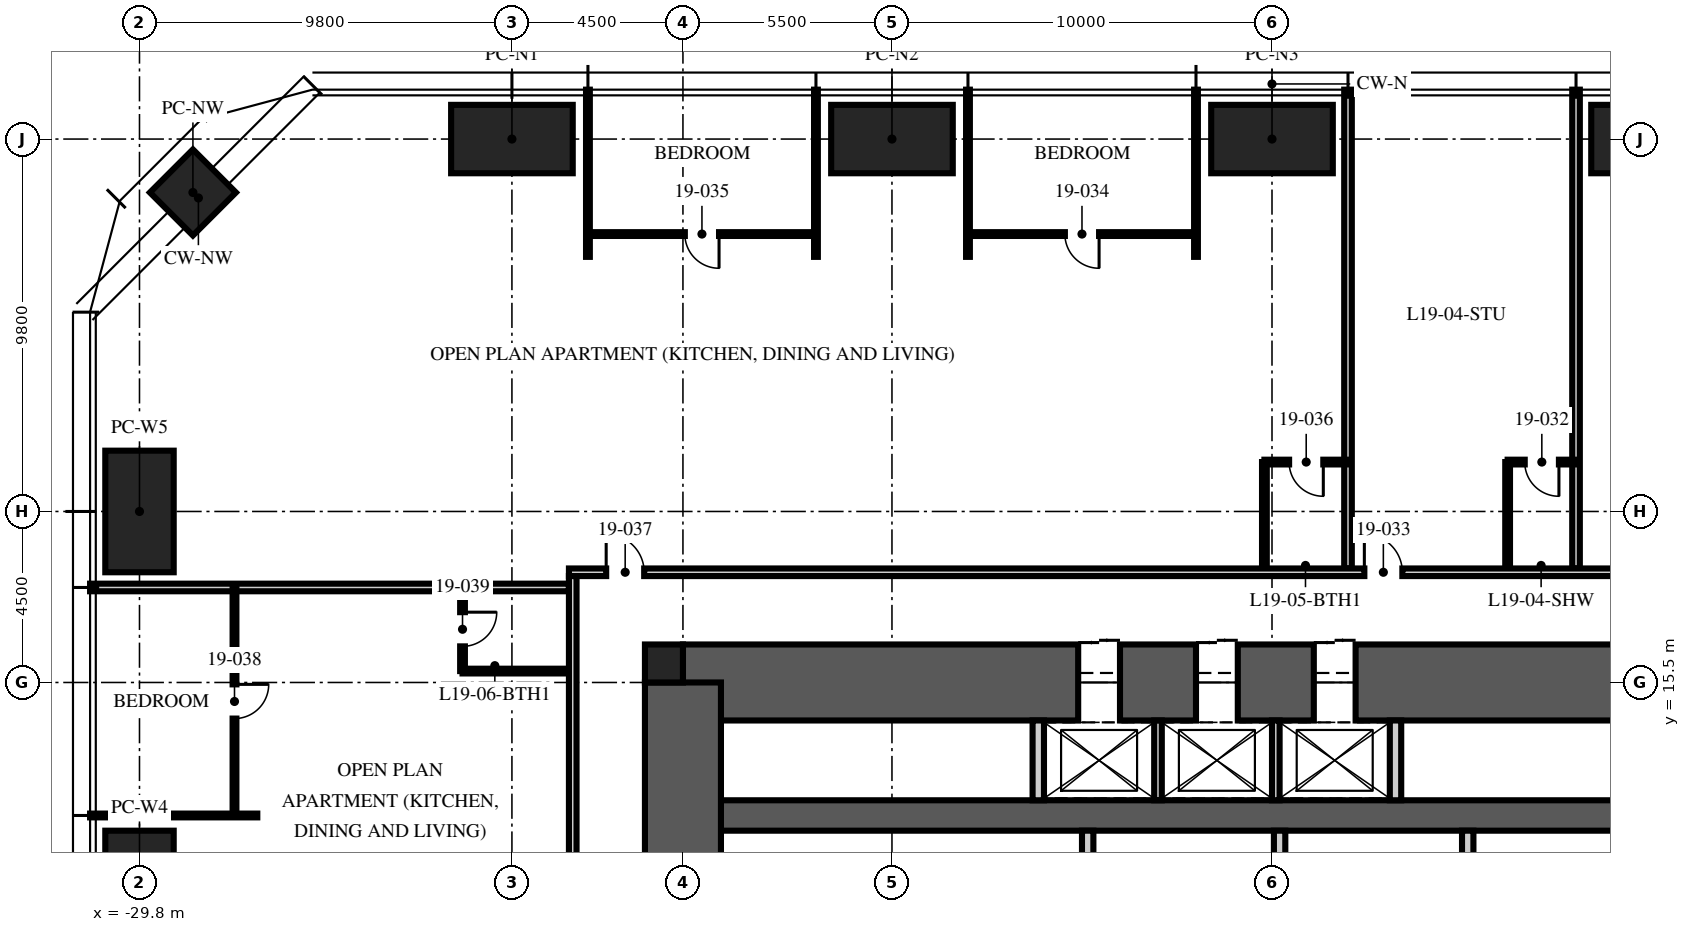
"""IFC4 building model, lengths in metres.
Left out: names, types, materials, properties, quantities, classifications, styles, units other than length and angle.
Written with IfcOpenShell. Run it as: python <this file> out.ifc"""

import sys

from ifc_helpers import new_model, si_unit, direction, frame, frame_2d, origin, origin_2d, place, context, subcontext, project, spatial, rectangle, hollow_rectangle, extrude, element, fill, save


model = new_model("IFC4")
c1 = context("Model", 3, precision=1e-05, world=origin(), true_north=direction((0.0, 1.0)))
c2 = subcontext(c1, "Body", "Model", "MODEL_VIEW")
j1 = project(units=[si_unit("LENGTHUNIT", "METRE"), si_unit("PLANEANGLEUNIT", "RADIAN")], contexts=[c1])
p1 = place(None, origin())
s1 = spatial("IfcSite", under=j1, at=p1, CompositionType="ELEMENT")
p2 = place(p1, origin())
s2 = spatial("IfcBuilding", under=s1, at=p2, CompositionType="ELEMENT")
p3 = place(p2, frame((0.0, 0.0, 77.25)))
s3 = spatial("IfcBuildingStorey", under=s2, at=p3, CompositionType="ELEMENT", Elevation=77.25)
p4 = place(p3, frame((-15.5, 15.5, -0.25), z_axis=(0.0, 0.0, 1.0), x_axis=(1.0, 0.0, 0.0)))
e1 = element("IfcWall", 1, at=p4, inside=s3, PredefinedType="SHEAR", context=c2, shape_type="SweptSolid", body=[
    extrude(rectangle(XDim=31.0, YDim=2.0, at=frame_2d((15.5, 0.0))), origin(), (0.0, 0.0, 1.0), 3.75),
])
p5 = place(p4, frame((10.4, 0.0, 0.25)))
e2 = element("IfcOpeningElement", 2, at=p5, cuts=e1, PredefinedType="OPENING", context=c2, shape_type="SweptSolid", body=[
    extrude(rectangle(XDim=1.1, YDim=2.1, at=frame_2d((0.55, 1.05))), frame((0.0, 1.01, 0.0), z_axis=(0.0, -1.0, 0.0), x_axis=(1.0, 0.0, 0.0)), (0.0, 0.0, 1.0), 2.02),
])
p6 = place(p4, frame((13.5, 0.0, 0.25)))
e3 = element("IfcOpeningElement", 3, at=p6, cuts=e1, PredefinedType="OPENING", context=c2, shape_type="SweptSolid", body=[
    extrude(rectangle(XDim=1.1, YDim=2.1, at=frame_2d((0.55, 1.05))), frame((0.0, 1.01, 0.0), z_axis=(0.0, -1.0, 0.0), x_axis=(1.0, 0.0, 0.0)), (0.0, 0.0, 1.0), 2.02),
])
p7 = place(p4, frame((16.6, 0.0, 0.25)))
e4 = element("IfcOpeningElement", 4, at=p7, cuts=e1, PredefinedType="OPENING", context=c2, shape_type="SweptSolid", body=[
    extrude(rectangle(XDim=1.1, YDim=2.1, at=frame_2d((0.55, 1.05))), frame((0.0, 1.01, 0.0), z_axis=(0.0, -1.0, 0.0), x_axis=(1.0, 0.0, 0.0)), (0.0, 0.0, 1.0), 2.02),
])
p8 = place(p3, frame((-15.5, 12.0, -0.25), z_axis=(0.0, 0.0, 1.0), x_axis=(1.0, 0.0, 0.0)))
e5 = element("IfcWall", 5, at=p8, inside=s3, PredefinedType="SHEAR", context=c2, shape_type="SweptSolid", body=[
    extrude(rectangle(XDim=31.0, YDim=0.8, at=frame_2d((15.5, 0.0))), origin(), (0.0, 0.0, 1.0), 3.75),
])
p9 = place(p3, frame((-15.5, -15.5, -0.25), z_axis=(0.0, 0.0, 1.0), x_axis=(0.0, 1.0, 0.0)))
e6 = element("IfcWall", 6, at=p9, inside=s3, PredefinedType="SHEAR", context=c2, shape_type="SweptSolid", body=[
    extrude(rectangle(XDim=31.0, YDim=2.0, at=frame_2d((15.5, 0.0))), origin(), (0.0, 0.0, 1.0), 3.75),
])
p10 = place(p9, frame((6.5, 0.0, 0.25)))
e7 = element("IfcOpeningElement", 7, at=p10, cuts=e6, PredefinedType="OPENING", context=c2, shape_type="SweptSolid", body=[
    extrude(rectangle(XDim=1.2, YDim=2.1, at=frame_2d((0.6, 1.05))), frame((0.0, 1.01, 0.0), z_axis=(0.0, -1.0, 0.0), x_axis=(1.0, 0.0, 0.0)), (0.0, 0.0, 1.0), 2.02),
])
p11 = place(p9, frame((23.0, 0.0, 0.25)))
e8 = element("IfcOpeningElement", 8, at=p11, cuts=e6, PredefinedType="OPENING", context=c2, shape_type="SweptSolid", body=[
    extrude(rectangle(XDim=1.8, YDim=2.1, at=frame_2d((0.9, 1.05))), frame((0.0, 1.01, 0.0), z_axis=(0.0, -1.0, 0.0), x_axis=(1.0, 0.0, 0.0)), (0.0, 0.0, 1.0), 2.02),
])
p12 = place(p3, frame((-16.0, 16.0, -0.25), z_axis=(0.0, 0.0, 1.0), x_axis=(1.0, 0.0, 0.0)))
e9 = element("IfcColumn", 9, at=p12, inside=s3, PredefinedType="COLUMN", context=c2, shape_type="SweptSolid", body=[
    extrude(rectangle(XDim=1.0, YDim=1.0, at=origin_2d()), origin(), (0.0, 0.0, 1.0), 3.75),
])
for number, where, z_axis, x_axis in (
    (10, (-20.0, 29.8, 0.0), (0.0, 0.0, 1.0), (1.0, 0.0, 0.0)),
    (11, (-10.0, 29.8, 0.0), (0.0, 0.0, 1.0), (1.0, 0.0, 0.0)),
    (12, (0.0, 29.8, 0.0), (0.0, 0.0, 1.0), (1.0, 0.0, 0.0)),
    (13, (10.0, 29.8, 0.0), (0.0, 0.0, 1.0), (1.0, 0.0, 0.0)),
    (14, (-29.8, 10.0, 0.0), (0.0, 0.0, 1.0), (0.0, 1.0, 0.0)),
    (15, (-29.8, 20.0, 0.0), (0.0, 0.0, 1.0), (0.0, 1.0, 0.0)),
):
    element("IfcColumn", number, at=place(p3, frame(where, z_axis=z_axis, x_axis=x_axis)), inside=s3, PredefinedType="COLUMN", context=c2, shape_type="SweptSolid", body=[
        extrude(hollow_rectangle(XDim=3.2, YDim=1.8, WallThickness=0.2, at=origin_2d()), origin(), (0.0, 0.0, 1.0), 3.75),
    ])
p13 = place(p3, frame((-28.394, 28.394, 0.0), z_axis=(0.0, 0.0, 1.0), x_axis=(0.707106781187, 0.707106781187, 0.0)))
e16 = element("IfcColumn", 16, at=p13, inside=s3, PredefinedType="COLUMN", context=c2, shape_type="SweptSolid", body=[
    extrude(hollow_rectangle(XDim=1.6, YDim=1.6, WallThickness=0.1, at=origin_2d()), origin(), (0.0, 0.0, 1.0), 3.75),
])
for number, where, z_axis, x_axis in (
    (17, (-6.15, 12.4, 0.0), (0.0, 0.0, 1.0), (0.0, 1.0, 0.0)),
    (18, (3.25, 12.4, 0.0), (0.0, 0.0, 1.0), (0.0, 1.0, 0.0)),
):
    element("IfcWall", number, at=place(p3, frame(where, z_axis=z_axis, x_axis=x_axis)), inside=s3, PredefinedType="PARTITIONING", context=c2, shape_type="SweptSolid", body=[
        extrude(rectangle(XDim=2.1, YDim=0.3, at=frame_2d((1.05, 0.0))), origin(), (0.0, 0.0, 1.0), 3.5),
    ])
for number, where, z_axis, x_axis in (
    (19, (-3.0, 12.4, 0.0), (0.0, 0.0, 1.0), (0.0, 1.0, 0.0)),
    (20, (0.1, 12.4, 0.0), (0.0, 0.0, 1.0), (0.0, 1.0, 0.0)),
):
    element("IfcWall", number, at=place(p3, frame(where, z_axis=z_axis, x_axis=x_axis)), inside=s3, PredefinedType="PARTITIONING", context=c2, shape_type="SweptSolid", body=[
        extrude(rectangle(XDim=2.1, YDim=0.2, at=frame_2d((1.05, 0.0))), origin(), (0.0, 0.0, 1.0), 3.5),
    ])
p14 = place(p3, frame((-4.85, 5.3, 0.0), z_axis=(0.0, 0.0, 1.0), x_axis=(0.0, 1.0, 0.0)))
e21 = element("IfcWall", 21, at=p14, inside=s3, PredefinedType="PARTITIONING", context=c2, shape_type="SweptSolid", body=[
    extrude(rectangle(XDim=6.3, YDim=0.3, at=frame_2d((3.15, 0.0))), origin(), (0.0, 0.0, 1.0), 3.5),
])
p15 = place(p14, frame((4.35, 0.0, 0.0)))
e22 = element("IfcOpeningElement", 22, at=p15, cuts=e21, PredefinedType="OPENING", context=c2, shape_type="SweptSolid", body=[
    extrude(rectangle(XDim=0.9, YDim=2.1, at=frame_2d((0.45, 1.05))), frame((0.0, 0.16, 0.0), z_axis=(0.0, -1.0, 0.0), x_axis=(1.0, 0.0, 0.0)), (0.0, 0.0, 1.0), 0.32),
])
p16 = place(p3, frame((5.15, 5.3, 0.0), z_axis=(0.0, 0.0, 1.0), x_axis=(0.0, 1.0, 0.0)))
e23 = element("IfcWall", 23, at=p16, inside=s3, PredefinedType="PARTITIONING", context=c2, shape_type="SweptSolid", body=[
    extrude(rectangle(XDim=6.3, YDim=0.3, at=frame_2d((3.15, 0.0))), origin(), (0.0, 0.0, 1.0), 3.5),
])
p17 = place(p16, frame((4.35, 0.0, 0.0)))
e24 = element("IfcOpeningElement", 24, at=p17, cuts=e23, PredefinedType="OPENING", context=c2, shape_type="SweptSolid", body=[
    extrude(rectangle(XDim=0.9, YDim=2.1, at=frame_2d((0.45, 1.05))), frame((0.0, 0.16, 0.0), z_axis=(0.0, -1.0, 0.0), x_axis=(1.0, 0.0, 0.0)), (0.0, 0.0, 1.0), 0.32),
])
p18 = place(p3, frame((0.2, 8.5, 0.0), z_axis=(0.0, 0.0, 1.0), x_axis=(0.0, 1.0, 0.0)))
e25 = element("IfcWall", 25, at=p18, inside=s3, PredefinedType="PARTITIONING", context=c2, shape_type="SweptSolid", body=[
    extrude(rectangle(XDim=3.1, YDim=0.3, at=frame_2d((1.55, 0.0))), origin(), (0.0, 0.0, 1.0), 3.5),
])
for number, where, z_axis, x_axis in (
    (26, (8.0, 18.5, 0.0), (0.0, 0.0, 1.0), (0.0, 1.0, 0.0)),
    (27, (2.0, 18.5, 0.0), (0.0, 0.0, 1.0), (0.0, 1.0, 0.0)),
):
    element("IfcWall", number, at=place(p3, frame(where, z_axis=z_axis, x_axis=x_axis)), inside=s3, PredefinedType="PARTITIONING", context=c2, shape_type="SweptSolid", body=[
        extrude(rectangle(XDim=12.6, YDim=0.2, at=frame_2d((6.3, 0.0))), origin(), (0.0, 0.0, 1.0), 2.71),
    ])
for number, where, z_axis, x_axis in (
    (28, (-2.0, 26.7, 0.0), (0.0, 0.0, 1.0), (0.0, 1.0, 0.0)),
    (29, (-8.0, 26.7, 0.0), (0.0, 0.0, 1.0), (0.0, 1.0, 0.0)),
    (30, (-12.0, 26.7, 0.0), (0.0, 0.0, 1.0), (0.0, 1.0, 0.0)),
    (31, (-18.0, 26.7, 0.0), (0.0, 0.0, 1.0), (0.0, 1.0, 0.0)),
):
    element("IfcWall", number, at=place(p3, frame(where, z_axis=z_axis, x_axis=x_axis)), inside=s3, PredefinedType="PARTITIONING", context=c2, shape_type="SweptSolid", body=[
        extrude(rectangle(XDim=4.4, YDim=0.1, at=frame_2d((2.2, 0.0))), origin(), (0.0, 0.0, 1.0), 2.71),
    ])
p19 = place(p3, frame((-18.5, 18.0, 0.0), z_axis=(0.0, 0.0, 1.0), x_axis=(-1.0, 0.0, 0.0)))
e32 = element("IfcWall", 32, at=p19, inside=s3, PredefinedType="PARTITIONING", context=c2, shape_type="SweptSolid", body=[
    extrude(rectangle(XDim=12.6, YDim=0.2, at=frame_2d((6.3, 0.0))), origin(), (0.0, 0.0, 1.0), 2.3),
])
p20 = place(p3, frame((-26.7, 12.0, 0.0), z_axis=(0.0, 0.0, 1.0), x_axis=(-1.0, 0.0, 0.0)))
e33 = element("IfcWall", 33, at=p20, inside=s3, PredefinedType="PARTITIONING", context=c2, shape_type="SweptSolid", body=[
    extrude(rectangle(XDim=4.4, YDim=0.1, at=frame_2d((2.2, 0.0))), origin(), (0.0, 0.0, 1.0), 2.71),
])
p21 = place(p3, frame((8.0, 21.3, 0.0), z_axis=(0.0, 0.0, 1.0), x_axis=(-1.0, 0.0, 0.0)))
e34 = element("IfcWall", 34, at=p21, inside=s3, PredefinedType="PARTITIONING", context=c2, shape_type="SweptSolid", body=[
    extrude(rectangle(XDim=1.8, YDim=0.125, at=frame_2d((0.9, 0.0))), origin(), (0.0, 0.0, 1.0), 3.5),
])
p22 = place(p21, frame((0.45, 0.0, 0.0)))
e35 = element("IfcOpeningElement", 35, at=p22, cuts=e34, PredefinedType="OPENING", context=c2, shape_type="SweptSolid", body=[
    extrude(rectangle(XDim=0.9, YDim=2.1, at=frame_2d((0.45, 1.05))), frame((0.0, 0.073, 0.0), z_axis=(0.0, -1.0, 0.0), x_axis=(1.0, 0.0, 0.0)), (0.0, 0.0, 1.0), 0.145),
])
p23 = place(p3, frame((6.2, 18.5, 0.0), z_axis=(0.0, 0.0, 1.0), x_axis=(0.0, 1.0, 0.0)))
e36 = element("IfcWall", 36, at=p23, inside=s3, PredefinedType="PARTITIONING", context=c2, shape_type="SweptSolid", body=[
    extrude(rectangle(XDim=2.8, YDim=0.125, at=frame_2d((1.4, 0.0))), origin(), (0.0, 0.0, 1.0), 3.5),
])
p24 = place(p3, frame((-2.0, 27.3, 0.0), z_axis=(0.0, 0.0, 1.0), x_axis=(-1.0, 0.0, 0.0)))
e37 = element("IfcWall", 37, at=p24, inside=s3, PredefinedType="PARTITIONING", context=c2, shape_type="SweptSolid", body=[
    extrude(rectangle(XDim=6.0, YDim=0.1, at=frame_2d((3.0, 0.0))), origin(), (0.0, 0.0, 1.0), 2.61),
])
p25 = place(p24, frame((2.55, 0.0, 0.0)))
e38 = element("IfcOpeningElement", 38, at=p25, cuts=e37, PredefinedType="OPENING", context=c2, shape_type="SweptSolid", body=[
    extrude(rectangle(XDim=0.9, YDim=2.1, at=frame_2d((0.45, 1.05))), frame((0.0, 0.06, 0.0), z_axis=(0.0, -1.0, 0.0), x_axis=(1.0, 0.0, 0.0)), (0.0, 0.0, 1.0), 0.12),
])
p26 = place(p3, frame((-12.0, 27.3, 0.0), z_axis=(0.0, 0.0, 1.0), x_axis=(-1.0, 0.0, 0.0)))
e39 = element("IfcWall", 39, at=p26, inside=s3, PredefinedType="PARTITIONING", context=c2, shape_type="SweptSolid", body=[
    extrude(rectangle(XDim=6.0, YDim=0.1, at=frame_2d((3.0, 0.0))), origin(), (0.0, 0.0, 1.0), 2.61),
])
p27 = place(p26, frame((2.55, 0.0, 0.0)))
e40 = element("IfcOpeningElement", 40, at=p27, cuts=e39, PredefinedType="OPENING", context=c2, shape_type="SweptSolid", body=[
    extrude(rectangle(XDim=0.9, YDim=2.1, at=frame_2d((0.45, 1.05))), frame((0.0, 0.06, 0.0), z_axis=(0.0, -1.0, 0.0), x_axis=(1.0, 0.0, 0.0)), (0.0, 0.0, 1.0), 0.12),
])
p28 = place(p3, frame((2.0, 21.3, 0.0), z_axis=(0.0, 0.0, 1.0), x_axis=(-1.0, 0.0, 0.0)))
e41 = element("IfcWall", 41, at=p28, inside=s3, PredefinedType="PARTITIONING", context=c2, shape_type="SweptSolid", body=[
    extrude(rectangle(XDim=2.2, YDim=0.125, at=frame_2d((1.1, 0.0))), origin(), (0.0, 0.0, 1.0), 2.492),
])
p29 = place(p28, frame((0.65, 0.0, 0.0)))
e42 = element("IfcOpeningElement", 42, at=p29, cuts=e41, PredefinedType="OPENING", context=c2, shape_type="SweptSolid", body=[
    extrude(rectangle(XDim=0.9, YDim=2.1, at=frame_2d((0.45, 1.05))), frame((0.0, 0.073, 0.0), z_axis=(0.0, -1.0, 0.0), x_axis=(1.0, 0.0, 0.0)), (0.0, 0.0, 1.0), 0.145),
])
p30 = place(p3, frame((-0.2, 18.5, 0.0), z_axis=(0.0, 0.0, 1.0), x_axis=(0.0, 1.0, 0.0)))
e43 = element("IfcWall", 43, at=p30, inside=s3, PredefinedType="PARTITIONING", context=c2, shape_type="SweptSolid", body=[
    extrude(rectangle(XDim=2.8, YDim=0.125, at=frame_2d((1.4, 0.0))), origin(), (0.0, 0.0, 1.0), 2.492),
])
p31 = place(p3, frame((-27.3, 18.0, 0.0), z_axis=(0.0, 0.0, 1.0), x_axis=(0.0, -1.0, 0.0)))
e44 = element("IfcWall", 44, at=p31, inside=s3, PredefinedType="PARTITIONING", context=c2, shape_type="SweptSolid", body=[
    extrude(rectangle(XDim=6.0, YDim=0.1, at=frame_2d((3.0, 0.0))), origin(), (0.0, 0.0, 1.0), 2.61),
])
p32 = place(p31, frame((2.55, 0.0, 0.0)))
e45 = element("IfcOpeningElement", 45, at=p32, cuts=e44, PredefinedType="OPENING", context=c2, shape_type="SweptSolid", body=[
    extrude(rectangle(XDim=0.9, YDim=2.1, at=frame_2d((0.45, 1.05))), frame((0.0, 0.06, 0.0), z_axis=(0.0, -1.0, 0.0), x_axis=(1.0, 0.0, 0.0)), (0.0, 0.0, 1.0), 0.12),
])
p33 = place(p3, frame((-21.3, 18.0, 0.0), z_axis=(0.0, 0.0, 1.0), x_axis=(0.0, -1.0, 0.0)))
e46 = element("IfcWall", 46, at=p33, inside=s3, PredefinedType="PARTITIONING", context=c2, shape_type="SweptSolid", body=[
    extrude(rectangle(XDim=2.2, YDim=0.125, at=frame_2d((1.1, 0.0))), origin(), (0.0, 0.0, 1.0), 3.5),
])
p34 = place(p33, frame((0.65, 0.0, 0.0)))
e47 = element("IfcOpeningElement", 47, at=p34, cuts=e46, PredefinedType="OPENING", context=c2, shape_type="SweptSolid", body=[
    extrude(rectangle(XDim=0.9, YDim=2.1, at=frame_2d((0.45, 1.05))), frame((0.0, 0.073, 0.0), z_axis=(0.0, -1.0, 0.0), x_axis=(1.0, 0.0, 0.0)), (0.0, 0.0, 1.0), 0.145),
])
p35 = place(p3, frame((-18.5, 15.8, 0.0), z_axis=(0.0, 0.0, 1.0), x_axis=(-1.0, 0.0, 0.0)))
e48 = element("IfcWall", 48, at=p35, inside=s3, PredefinedType="PARTITIONING", context=c2, shape_type="SweptSolid", body=[
    extrude(rectangle(XDim=2.8, YDim=0.125, at=frame_2d((1.4, 0.0))), origin(), (0.0, 0.0, 1.0), 3.5),
])
p36 = place(p3, frame((-18.5, 18.4, 0.0), z_axis=(0.0, 0.0, 1.0), x_axis=(1.0, 0.0, 0.0)))
e49 = element("IfcWall", 49, at=p36, inside=s3, PredefinedType="PARTITIONING", context=c2, shape_type="SweptSolid", body=[
    extrude(rectangle(XDim=37.0, YDim=0.2, at=frame_2d((18.5, 0.0))), origin(), (0.0, 0.0, 1.0), 2.3),
])
p37 = place(p36, frame((20.93, 0.0, 0.0)))
e50 = element("IfcOpeningElement", 50, at=p37, cuts=e49, PredefinedType="OPENING", context=c2, shape_type="SweptSolid", body=[
    extrude(rectangle(XDim=1.0, YDim=2.2, at=frame_2d((0.5, 1.1))), frame((0.0, 0.11, 0.0), z_axis=(0.0, -1.0, 0.0), x_axis=(1.0, 0.0, 0.0)), (0.0, 0.0, 1.0), 0.22),
])
p38 = place(p36, frame((0.98, 0.0, 0.0)))
e51 = element("IfcOpeningElement", 51, at=p38, cuts=e49, PredefinedType="OPENING", context=c2, shape_type="SweptSolid", body=[
    extrude(rectangle(XDim=1.0, YDim=2.2, at=frame_2d((0.5, 1.1))), frame((0.0, 0.11, 0.0), z_axis=(0.0, -1.0, 0.0), x_axis=(1.0, 0.0, 0.0)), (0.0, 0.0, 1.0), 0.22),
])
p39 = place(p3, frame((-18.4, 18.3, 0.0), z_axis=(0.0, 0.0, 1.0), x_axis=(0.0, -1.0, 0.0)))
e52 = element("IfcWall", 52, at=p39, inside=s3, PredefinedType="PARTITIONING", context=c2, shape_type="SweptSolid", body=[
    extrude(rectangle(XDim=36.6, YDim=0.2, at=frame_2d((18.3, 0.0))), origin(), (0.0, 0.0, 1.0), 2.3),
])
p40 = place(p39, frame((8.57, 0.0, 0.0)))
e53 = element("IfcOpeningElement", 53, at=p40, cuts=e52, PredefinedType="OPENING", context=c2, shape_type="SweptSolid", body=[
    extrude(rectangle(XDim=1.0, YDim=2.2, at=frame_2d((0.5, 1.1))), frame((0.0, 0.11, 0.0), z_axis=(0.0, -1.0, 0.0), x_axis=(1.0, 0.0, 0.0)), (0.0, 0.0, 1.0), 0.22),
])
p41 = place(p39, frame((34.57, 0.0, 0.0)))
e54 = element("IfcOpeningElement", 54, at=p41, cuts=e52, PredefinedType="OPENING", context=c2, shape_type="SweptSolid", body=[
    extrude(rectangle(XDim=1.0, YDim=2.2, at=frame_2d((0.5, 1.1))), frame((0.0, 0.11, 0.0), z_axis=(0.0, -1.0, 0.0), x_axis=(1.0, 0.0, 0.0)), (0.0, 0.0, 1.0), 0.22),
])
p42 = place(p5, origin())
e55 = element("IfcDoor", 55, at=p42, inside=s3, OperationType="DOUBLE_DOOR_SLIDING", PredefinedType="DOOR", context=c2, shape_type="SweptSolid", body=[
    extrude(rectangle(XDim=1.1, YDim=2.1, at=frame_2d((0.55, 1.05))), frame((0.0, 0.025, 0.0), z_axis=(0.0, -1.0, 0.0), x_axis=(1.0, 0.0, 0.0)), (0.0, 0.0, 1.0), 0.05),
])
fill(e2, e55)
p43 = place(p6, origin())
e56 = element("IfcDoor", 56, at=p43, inside=s3, OperationType="DOUBLE_DOOR_SLIDING", PredefinedType="DOOR", context=c2, shape_type="SweptSolid", body=[
    extrude(rectangle(XDim=1.1, YDim=2.1, at=frame_2d((0.55, 1.05))), frame((0.0, 0.025, 0.0), z_axis=(0.0, -1.0, 0.0), x_axis=(1.0, 0.0, 0.0)), (0.0, 0.0, 1.0), 0.05),
])
fill(e3, e56)
p44 = place(p7, origin())
e57 = element("IfcDoor", 57, at=p44, inside=s3, OperationType="DOUBLE_DOOR_SLIDING", PredefinedType="DOOR", context=c2, shape_type="SweptSolid", body=[
    extrude(rectangle(XDim=1.1, YDim=2.1, at=frame_2d((0.55, 1.05))), frame((0.0, 0.025, 0.0), z_axis=(0.0, -1.0, 0.0), x_axis=(1.0, 0.0, 0.0)), (0.0, 0.0, 1.0), 0.05),
])
fill(e4, e57)
p45 = place(p22, origin())
e58 = element("IfcDoor", 58, at=p45, inside=s3, OperationType="SINGLE_SWING_LEFT", PredefinedType="DOOR", context=c2, shape_type="SweptSolid", body=[
    extrude(rectangle(XDim=0.9, YDim=2.1, at=frame_2d((0.45, 1.05))), frame((0.0, 0.025, 0.0), z_axis=(0.0, -1.0, 0.0), x_axis=(1.0, 0.0, 0.0)), (0.0, 0.0, 1.0), 0.05),
])
fill(e35, e58)
p46 = place(p37, origin())
e59 = element("IfcDoor", 59, at=p46, inside=s3, OperationType="SINGLE_SWING_LEFT", PredefinedType="DOOR", context=c2, shape_type="SweptSolid", body=[
    extrude(rectangle(XDim=1.0, YDim=2.2, at=frame_2d((0.5, 1.1))), frame((0.0, 0.025, 0.0), z_axis=(0.0, -1.0, 0.0), x_axis=(1.0, 0.0, 0.0)), (0.0, 0.0, 1.0), 0.05),
])
fill(e50, e59)
p47 = place(p25, origin())
e60 = element("IfcDoor", 60, at=p47, inside=s3, OperationType="SINGLE_SWING_LEFT", PredefinedType="DOOR", context=c2, shape_type="SweptSolid", body=[
    extrude(rectangle(XDim=0.9, YDim=2.1, at=frame_2d((0.45, 1.05))), frame((0.0, 0.025, 0.0), z_axis=(0.0, -1.0, 0.0), x_axis=(1.0, 0.0, 0.0)), (0.0, 0.0, 1.0), 0.05),
])
fill(e38, e60)
p48 = place(p27, origin())
e61 = element("IfcDoor", 61, at=p48, inside=s3, OperationType="SINGLE_SWING_LEFT", PredefinedType="DOOR", context=c2, shape_type="SweptSolid", body=[
    extrude(rectangle(XDim=0.9, YDim=2.1, at=frame_2d((0.45, 1.05))), frame((0.0, 0.025, 0.0), z_axis=(0.0, -1.0, 0.0), x_axis=(1.0, 0.0, 0.0)), (0.0, 0.0, 1.0), 0.05),
])
fill(e40, e61)
p49 = place(p29, origin())
e62 = element("IfcDoor", 62, at=p49, inside=s3, OperationType="SINGLE_SWING_LEFT", PredefinedType="DOOR", context=c2, shape_type="SweptSolid", body=[
    extrude(rectangle(XDim=0.9, YDim=2.1, at=frame_2d((0.45, 1.05))), frame((0.0, 0.025, 0.0), z_axis=(0.0, -1.0, 0.0), x_axis=(1.0, 0.0, 0.0)), (0.0, 0.0, 1.0), 0.05),
])
fill(e42, e62)
p50 = place(p38, origin())
e63 = element("IfcDoor", 63, at=p50, inside=s3, OperationType="SINGLE_SWING_LEFT", PredefinedType="DOOR", context=c2, shape_type="SweptSolid", body=[
    extrude(rectangle(XDim=1.0, YDim=2.2, at=frame_2d((0.5, 1.1))), frame((0.0, 0.025, 0.0), z_axis=(0.0, -1.0, 0.0), x_axis=(1.0, 0.0, 0.0)), (0.0, 0.0, 1.0), 0.05),
])
fill(e51, e63)
p51 = place(p32, origin())
e64 = element("IfcDoor", 64, at=p51, inside=s3, OperationType="SINGLE_SWING_LEFT", PredefinedType="DOOR", context=c2, shape_type="SweptSolid", body=[
    extrude(rectangle(XDim=0.9, YDim=2.1, at=frame_2d((0.45, 1.05))), frame((0.0, 0.025, 0.0), z_axis=(0.0, -1.0, 0.0), x_axis=(1.0, 0.0, 0.0)), (0.0, 0.0, 1.0), 0.05),
])
fill(e45, e64)
p52 = place(p34, origin())
e65 = element("IfcDoor", 65, at=p52, inside=s3, OperationType="SINGLE_SWING_LEFT", PredefinedType="DOOR", context=c2, shape_type="SweptSolid", body=[
    extrude(rectangle(XDim=0.9, YDim=2.1, at=frame_2d((0.45, 1.05))), frame((0.0, 0.025, 0.0), z_axis=(0.0, -1.0, 0.0), x_axis=(1.0, 0.0, 0.0)), (0.0, 0.0, 1.0), 0.05),
])
fill(e47, e65)
save(model, sys.argv[1])
